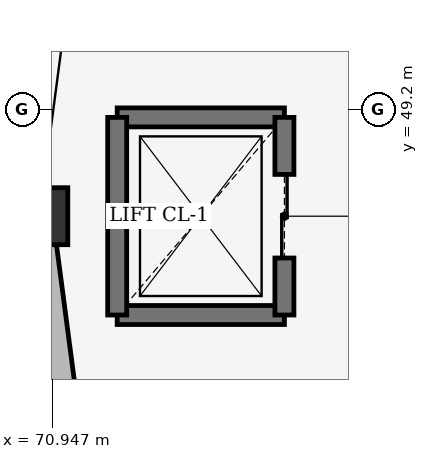
"""IFC4 building model, lengths in metres.
Left out: names, types, materials, properties, quantities, classifications, styles, units other than length and angle.
Written with IfcOpenShell. Run it as: python <this file> out.ifc"""

import sys

from ifc_helpers import new_model, si_unit, direction, frame, frame_2d, origin, origin_2d, place, context, subcontext, project, spatial, rectangle, extrude, element, fill, save


model = new_model("IFC4")
c1 = context("Model", 3, precision=1e-05, world=origin(), true_north=direction((0.0, 1.0)))
c2 = subcontext(c1, "Body", "Model", "MODEL_VIEW")
j1 = project(units=[si_unit("LENGTHUNIT", "METRE"), si_unit("PLANEANGLEUNIT", "RADIAN")], contexts=[c1])
p1 = place(None, origin())
s1 = spatial("IfcSite", under=j1, at=p1, CompositionType="ELEMENT")
p2 = place(p1, origin())
s2 = spatial("IfcBuilding", under=s1, at=p2, CompositionType="ELEMENT")
p3 = place(p2, frame((0.0, 0.0, 4.8)))
s3 = spatial("IfcBuildingStorey", under=s2, at=p3, CompositionType="ELEMENT", Elevation=4.8)
p4 = place(p3, frame((70.775, 47.8, 0.0), z_axis=(0.0, 0.0, 1.0), x_axis=(-1.0, 0.0, 0.0)))
e1 = element("IfcColumn", 1, at=p4, inside=s3, PredefinedType="COLUMN", context=c2, shape_type="SweptSolid", body=[
    extrude(rectangle(XDim=0.75, YDim=0.75, at=origin_2d()), origin(), (0.0, 0.0, 1.0), 6.0),
])
p5 = place(p3, frame((70.775, 47.8, 0.0), z_axis=(0.0, 0.0, 1.0), x_axis=(0.130565224353, -0.991439721914, 0.0)))
e2 = element("IfcWall", 2, at=p5, inside=s3, PredefinedType="STANDARD", context=c2, shape_type="SweptSolid", body=[
    extrude(rectangle(XDim=4.392, YDim=0.35, at=frame_2d((2.196, 0.0))), origin(), (0.0, 0.0, 1.0), 4.6),
])
for number, where, z_axis, x_axis in (
    (3, (71.8, 46.5, 0.0), (0.0, 0.0, 1.0), (1.0, 0.0, 0.0)),
    (4, (71.8, 49.1, 0.0), (0.0, 0.0, 1.0), (1.0, 0.0, 0.0)),
):
    element("IfcWall", number, at=place(p3, frame(where, z_axis=z_axis, x_axis=x_axis)), inside=s3, PredefinedType="SHEAR", context=c2, shape_type="SweptSolid", body=[
        extrude(rectangle(XDim=2.2, YDim=0.25, at=frame_2d((1.1, 0.0))), origin(), (0.0, 0.0, 1.0), 3.95),
    ])
p6 = place(p3, frame((71.8, 46.5, 0.0), z_axis=(0.0, 0.0, 1.0), x_axis=(0.0, 1.0, 0.0)))
e5 = element("IfcWall", 5, at=p6, inside=s3, PredefinedType="SHEAR", context=c2, shape_type="SweptSolid", body=[
    extrude(rectangle(XDim=2.6, YDim=0.25, at=frame_2d((1.3, 0.0))), origin(), (0.0, 0.0, 1.0), 3.95),
])
p7 = place(p3, frame((74.0, 46.5, 0.0), z_axis=(0.0, 0.0, 1.0), x_axis=(0.0, 1.0, 0.0)))
e6 = element("IfcWall", 6, at=p7, inside=s3, PredefinedType="SHEAR", context=c2, shape_type="SweptSolid", body=[
    extrude(rectangle(XDim=2.6, YDim=0.25, at=frame_2d((1.3, 0.0))), origin(), (0.0, 0.0, 1.0), 3.95),
])
p8 = place(p7, frame((0.75, 0.0, 0.0)))
e7 = element("IfcOpeningElement", 7, at=p8, cuts=e6, PredefinedType="OPENING", context=c2, shape_type="SweptSolid", body=[
    extrude(rectangle(XDim=1.1, YDim=2.2, at=frame_2d((0.55, 1.1))), frame((0.0, 0.135, 0.0), z_axis=(0.0, -1.0, 0.0), x_axis=(1.0, 0.0, 0.0)), (0.0, 0.0, 1.0), 0.27),
])
p9 = place(p8, origin())
e8 = element("IfcDoor", 8, at=p9, inside=s3, OperationType="DOUBLE_DOOR_SLIDING", PredefinedType="DOOR", context=c2, shape_type="SweptSolid", body=[
    extrude(rectangle(XDim=1.1, YDim=2.2, at=frame_2d((0.55, 1.1))), frame((0.0, 0.025, 0.0), z_axis=(0.0, -1.0, 0.0), x_axis=(1.0, 0.0, 0.0)), (0.0, 0.0, 1.0), 0.05),
])
fill(e7, e8)
save(model, sys.argv[1])
